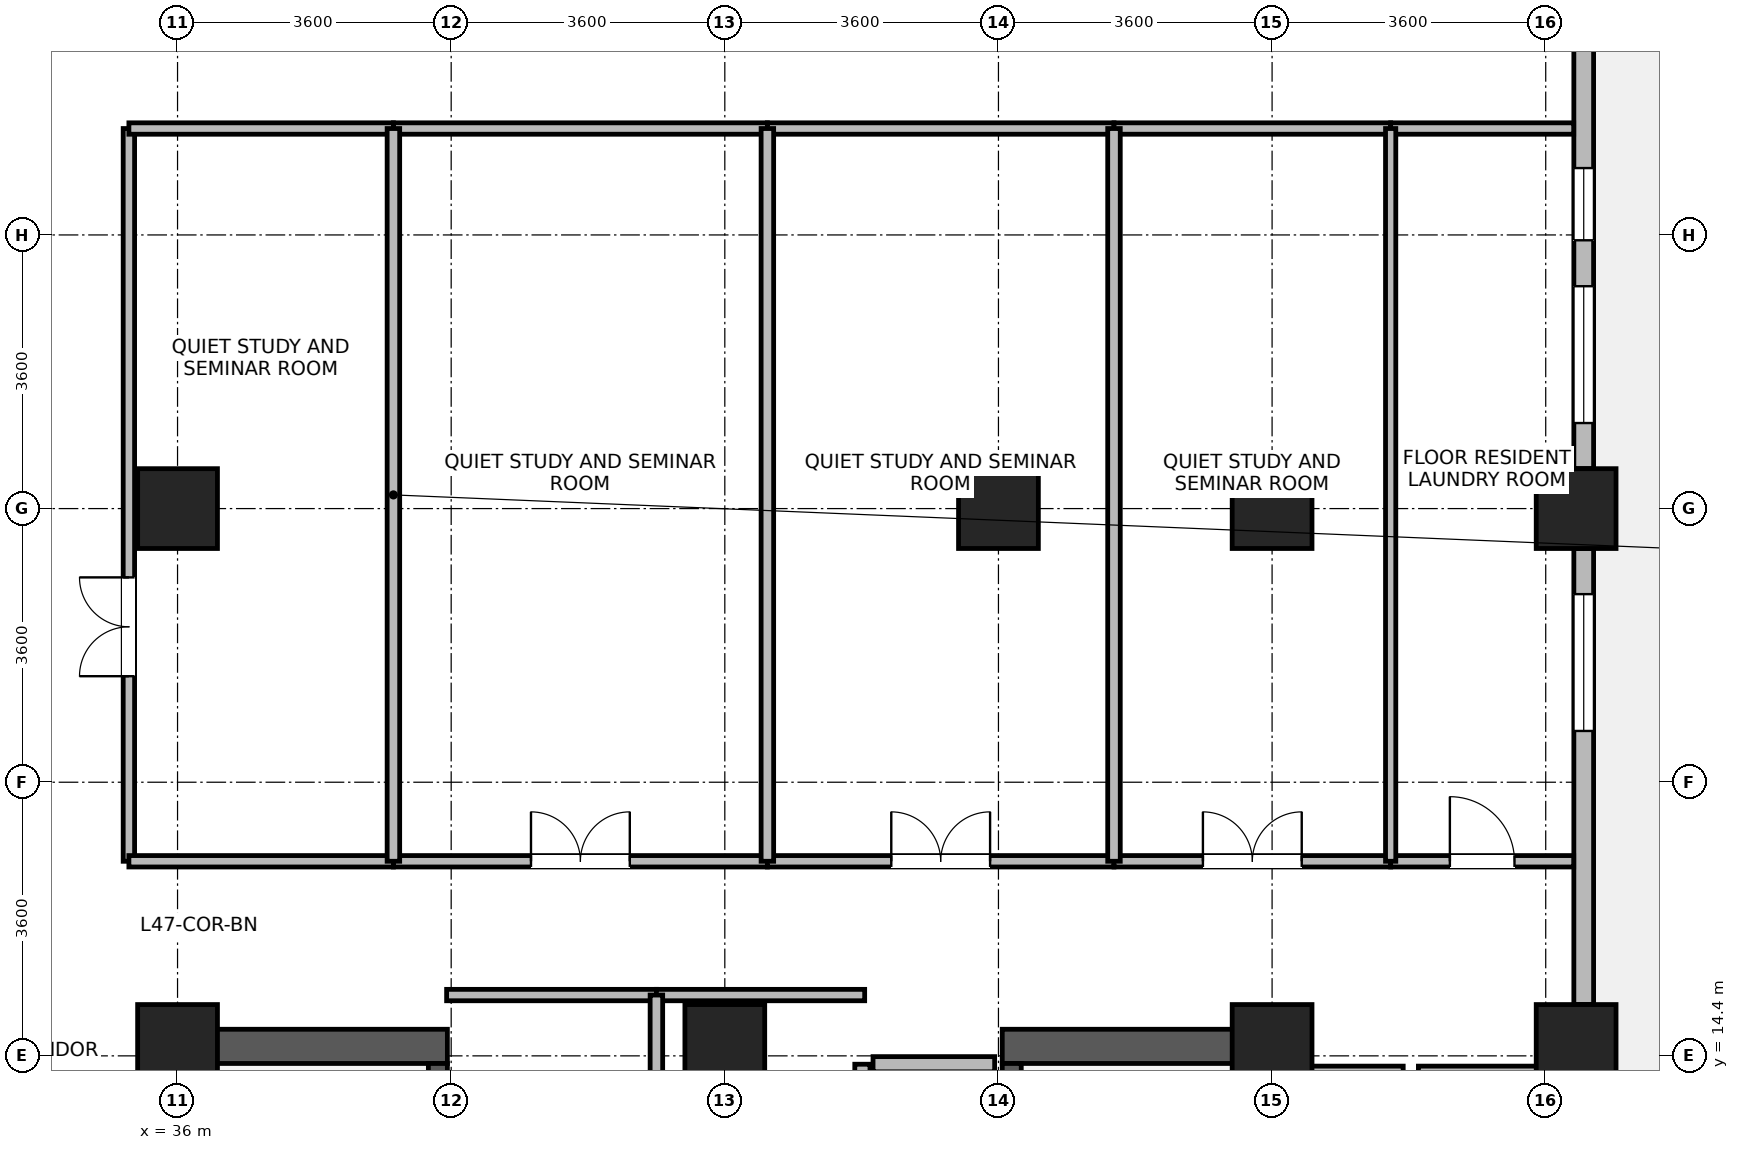
"""IFC4 building model, lengths in metres.
Left out: names, types, materials, properties, quantities, classifications, styles, units other than length and angle.
Written with IfcOpenShell. Run it as: python <this file> out.ifc"""

import sys

from ifc_helpers import new_model, si_unit, direction, frame, frame_2d, origin, origin_2d, place, context, subcontext, project, spatial, rectangle, extrude, source, transform, mapped, element, fill, save


model = new_model("IFC4")
c1 = context("Model", 3, precision=1e-05, world=origin(), true_north=direction((0.0, 1.0)))
c2 = subcontext(c1, "Body", "Model", "MODEL_VIEW")
j1 = project(units=[si_unit("LENGTHUNIT", "METRE"), si_unit("PLANEANGLEUNIT", "RADIAN")], contexts=[c1])
p1 = place(None, origin())
s1 = spatial("IfcSite", under=j1, at=p1, CompositionType="ELEMENT")
p2 = place(p1, origin())
s2 = spatial("IfcBuilding", under=s1, at=p2, CompositionType="ELEMENT")
p3 = place(p2, frame((0.0, 0.0, 184.6)))
s3 = spatial("IfcBuildingStorey", under=s2, at=p3, CompositionType="ELEMENT", Elevation=184.6)
for number, where, z_axis, x_axis in (
    (1, (36.125, 6.85, 0.0), (0.0, 0.0, 1.0), (0.0, 1.0, 0.0)),
    (2, (50.275, 6.85, 0.0), (0.0, 0.0, 1.0), (0.0, 1.0, 0.0)),
):
    element("IfcWall", number, at=place(p3, frame(where, z_axis=z_axis, x_axis=x_axis)), inside=s3, PredefinedType="SHEAR", context=c2, shape_type="SweptSolid", body=[
        extrude(rectangle(XDim=7.9, YDim=0.45, at=frame_2d((3.95, 0.0))), origin(), (0.0, 0.0, 1.0), 3.46),
    ])
for number, where, z_axis, x_axis in (
    (3, (36.35, 14.525, 0.0), (0.0, 0.0, 1.0), (1.0, 0.0, 0.0)),
    (4, (46.85, 14.525, 0.0), (0.0, 0.0, 1.0), (1.0, 0.0, 0.0)),
):
    element("IfcWall", number, at=place(p3, frame(where, z_axis=z_axis, x_axis=x_axis)), inside=s3, PredefinedType="SHEAR", context=c2, shape_type="SweptSolid", body=[
        extrude(rectangle(XDim=3.2, YDim=0.45, at=frame_2d((1.6, 0.0))), origin(), (0.0, 0.0, 1.0), 3.46),
    ])
p4 = place(p3, frame((39.425, 7.3, 0.0), z_axis=(0.0, 0.0, 1.0), x_axis=(0.0, 1.0, 0.0)))
e5 = element("IfcWall", 5, at=p4, inside=s3, PredefinedType="SHEAR", context=c2, shape_type="SweptSolid", body=[
    extrude(rectangle(XDim=7.0, YDim=0.25, at=frame_2d((3.5, 0.0))), origin(), (0.0, 0.0, 1.0), 3.46),
])
p5 = place(p4, frame((0.15, 0.0, 0.0)))
e6 = element("IfcOpeningElement", 6, at=p5, cuts=e5, PredefinedType="OPENING", context=c2, shape_type="SweptSolid", body=[
    extrude(rectangle(XDim=1.1, YDim=2.08, at=frame_2d((0.55, 1.04))), frame((0.0, 0.135, 0.0), z_axis=(0.0, -1.0, 0.0), x_axis=(1.0, 0.0, 0.0)), (0.0, 0.0, 1.0), 0.27),
])
p6 = place(p3, frame((46.975, 7.3, 0.0), z_axis=(0.0, 0.0, 1.0), x_axis=(0.0, 1.0, 0.0)))
e7 = element("IfcWall", 7, at=p6, inside=s3, PredefinedType="SHEAR", context=c2, shape_type="SweptSolid", body=[
    extrude(rectangle(XDim=7.0, YDim=0.25, at=frame_2d((3.5, 0.0))), origin(), (0.0, 0.0, 1.0), 3.46),
])
p7 = place(p6, frame((0.15, 0.0, 0.0)))
e8 = element("IfcOpeningElement", 8, at=p7, cuts=e7, PredefinedType="OPENING", context=c2, shape_type="SweptSolid", body=[
    extrude(rectangle(XDim=1.1, YDim=2.08, at=frame_2d((0.55, 1.04))), frame((0.0, 0.135, 0.0), z_axis=(0.0, -1.0, 0.0), x_axis=(1.0, 0.0, 0.0)), (0.0, 0.0, 1.0), 0.27),
])
m1 = source(origin(), c2, "Body", "SweptSolid", [
    extrude(rectangle(XDim=1.05, YDim=1.05, at=origin_2d()), origin(), (0.0, 0.0, 1.0), 3.7),
])
for number, where, z_axis, x_axis in (
    (9, (36.0, 21.6, 0.0), (0.0, 0.0, 1.0), (1.0, 0.0, 0.0)),
    (10, (46.8, 21.6, 0.0), (0.0, 0.0, 1.0), (1.0, 0.0, 0.0)),
    (11, (36.0, 14.55, 0.0), (0.0, 0.0, 1.0), (1.0, 0.0, 0.0)),
    (12, (43.2, 14.55, 0.0), (0.0, 0.0, 1.0), (1.0, 0.0, 0.0)),
    (13, (50.4, 14.55, 0.0), (0.0, 0.0, 1.0), (1.0, 0.0, 0.0)),
    (14, (50.4, 21.6, 0.0), (0.0, 0.0, 1.0), (1.0, 0.0, 0.0)),
    (15, (54.4, 14.55, 0.0), (0.0, 0.0, 1.0), (1.0, 0.0, 0.0)),
    (16, (54.4, 21.6, 0.0), (0.0, 0.0, 1.0), (1.0, 0.0, 0.0)),
):
    element("IfcColumn", number, at=place(p3, frame(where, z_axis=z_axis, x_axis=x_axis)), inside=s3, PredefinedType="COLUMN", context=c2, shape_type="MappedRepresentation", body=[
        mapped(m1, transform((0.0, 0.0, 0.0), x_axis=(1.0, 0.0, 0.0), y_axis=(0.0, 1.0, 0.0), z_axis=(0.0, 0.0, 1.0), scale=1.0)),
    ])
p8 = place(p3, frame((54.5, 21.074, 0.0), z_axis=(0.0, 0.0, 1.0), x_axis=(0.0, -1.0, 0.0)))
e17 = element("IfcWall", 17, at=p8, inside=s3, PredefinedType="STANDARD", context=c2, shape_type="SweptSolid", body=[
    extrude(rectangle(XDim=5.998, YDim=0.26, at=frame_2d((2.999, 0.0))), origin(), (0.0, 0.0, 1.0), 2.99),
])
p9 = place(p8, frame((0.6, 0.0, 0.85)))
e18 = element("IfcOpeningElement", 18, at=p9, cuts=e17, PredefinedType="OPENING", context=c2, shape_type="SweptSolid", body=[
    extrude(rectangle(XDim=1.8, YDim=1.85, at=frame_2d((0.9, 0.925))), frame((0.0, 0.14, 0.0), z_axis=(0.0, -1.0, 0.0), x_axis=(1.0, 0.0, 0.0)), (0.0, 0.0, 1.0), 0.28),
])
p10 = place(p3, frame((54.5, 28.124, 0.0), z_axis=(0.0, 0.0, 1.0), x_axis=(0.0, -1.0, 0.0)))
e19 = element("IfcWall", 19, at=p10, inside=s3, PredefinedType="STANDARD", context=c2, shape_type="SweptSolid", body=[
    extrude(rectangle(XDim=5.998, YDim=0.26, at=frame_2d((2.999, 0.0))), origin(), (0.0, 0.0, 1.0), 2.99),
])
p11 = place(p10, frame((3.598, 0.0, 0.85)))
e20 = element("IfcOpeningElement", 20, at=p11, cuts=e19, PredefinedType="OPENING", context=c2, shape_type="SweptSolid", body=[
    extrude(rectangle(XDim=1.8, YDim=1.85, at=frame_2d((0.9, 0.925))), frame((0.0, 0.14, 0.0), z_axis=(0.0, -1.0, 0.0), x_axis=(1.0, 0.0, 0.0)), (0.0, 0.0, 1.0), 0.28),
])
p12 = place(p10, frame((2.044, 0.0, 0.85)))
e21 = element("IfcOpeningElement", 21, at=p12, cuts=e19, PredefinedType="OPENING", context=c2, shape_type="SweptSolid", body=[
    extrude(rectangle(XDim=0.95, YDim=1.75, at=frame_2d((0.475, 0.875))), frame((0.0, 0.14, 0.0), z_axis=(0.0, -1.0, 0.0), x_axis=(1.0, 0.0, 0.0)), (0.0, 0.0, 1.0), 0.28),
])
p13 = place(p3, frame((50.475, 14.165, 0.0), z_axis=(0.0, 0.0, 1.0), x_axis=(1.0, 0.0, 0.0)))
e22 = element("IfcWall", 22, at=p13, inside=s3, PredefinedType="PARTITIONING", context=c2, shape_type="SweptSolid", body=[
    extrude(rectangle(XDim=1.65, YDim=0.2, at=frame_2d((0.825, 0.0))), origin(), (0.0, 0.0, 1.0), 3.44),
])
p14 = place(p3, frame((52.325, 14.165, 0.0), z_axis=(0.0, 0.0, 1.0), x_axis=(1.0, 0.0, 0.0)))
e23 = element("IfcWall", 23, at=p14, inside=s3, PredefinedType="PARTITIONING", context=c2, shape_type="SweptSolid", body=[
    extrude(rectangle(XDim=1.65, YDim=0.2, at=frame_2d((0.825, 0.0))), origin(), (0.0, 0.0, 1.0), 3.44),
])
p15 = place(p3, frame((45.15, 14.29, 0.0), z_axis=(0.0, 0.0, 1.0), x_axis=(1.0, 0.0, 0.0)))
e24 = element("IfcWall", 24, at=p15, inside=s3, PredefinedType="PARTITIONING", context=c2, shape_type="SweptSolid", body=[
    extrude(rectangle(XDim=1.6, YDim=0.2, at=frame_2d((0.8, 0.0))), origin(), (0.0, 0.0, 1.0), 2.44),
])
p16 = place(p3, frame((45.01, 11.61, 0.0), z_axis=(0.0, 0.0, 1.0), x_axis=(0.0, 1.0, 0.0)))
e25 = element("IfcWall", 25, at=p16, inside=s3, PredefinedType="PARTITIONING", context=c2, shape_type="SweptSolid", body=[
    extrude(rectangle(XDim=2.68, YDim=0.2, at=frame_2d((1.34, 0.0))), origin(), (0.0, 0.0, 1.0), 3.44),
])
p17 = place(p3, frame((35.36, 16.96, 0.0), z_axis=(0.0, 0.0, 1.0), x_axis=(0.0, 1.0, 0.0)))
e26 = element("IfcWall", 26, at=p17, inside=s3, PredefinedType="PARTITIONING", context=c2, shape_type="SweptSolid", body=[
    extrude(rectangle(XDim=9.64, YDim=0.15, at=frame_2d((4.82, 0.0))), origin(), (0.0, 0.0, 1.0), 3.44),
])
p18 = place(p17, frame((2.435, 0.0, 0.0)))
e27 = element("IfcOpeningElement", 27, at=p18, cuts=e26, PredefinedType="OPENING", context=c2, shape_type="SweptSolid", body=[
    extrude(rectangle(XDim=1.3, YDim=2.12, at=frame_2d((0.65, 1.06))), frame((0.0, 0.085, 0.0), z_axis=(0.0, -1.0, 0.0), x_axis=(1.0, 0.0, 0.0)), (0.0, 0.0, 1.0), 0.17),
])
p19 = place(p3, frame((38.84, 16.96, 0.0), z_axis=(0.0, 0.0, 1.0), x_axis=(1.0, 0.0, 0.0)))
e28 = element("IfcWall", 28, at=p19, inside=s3, PredefinedType="PARTITIONING", context=c2, shape_type="SweptSolid", body=[
    extrude(rectangle(XDim=4.92, YDim=0.15, at=frame_2d((2.46, 0.0))), origin(), (0.0, 0.0, 1.0), 3.44),
])
p20 = place(p19, frame((1.81, 0.0, 0.0)))
e29 = element("IfcOpeningElement", 29, at=p20, cuts=e28, PredefinedType="OPENING", context=c2, shape_type="SweptSolid", body=[
    extrude(rectangle(XDim=1.3, YDim=2.12, at=frame_2d((0.65, 1.06))), frame((0.0, 0.085, 0.0), z_axis=(0.0, -1.0, 0.0), x_axis=(1.0, 0.0, 0.0)), (0.0, 0.0, 1.0), 0.17),
])
p21 = place(p3, frame((38.84, 26.6, 0.0), z_axis=(0.0, 0.0, 1.0), x_axis=(1.0, 0.0, 0.0)))
e30 = element("IfcWall", 30, at=p21, inside=s3, PredefinedType="PARTITIONING", context=c2, shape_type="SweptSolid", body=[
    extrude(rectangle(XDim=4.92, YDim=0.15, at=frame_2d((2.46, 0.0))), origin(), (0.0, 0.0, 1.0), 3.44),
])
p22 = place(p3, frame((43.76, 16.96, 0.0), z_axis=(0.0, 0.0, 1.0), x_axis=(1.0, 0.0, 0.0)))
e31 = element("IfcWall", 31, at=p22, inside=s3, PredefinedType="PARTITIONING", context=c2, shape_type="SweptSolid", body=[
    extrude(rectangle(XDim=4.56, YDim=0.15, at=frame_2d((2.28, 0.0))), origin(), (0.0, 0.0, 1.0), 3.44),
])
p23 = place(p22, frame((1.63, 0.0, 0.0)))
e32 = element("IfcOpeningElement", 32, at=p23, cuts=e31, PredefinedType="OPENING", context=c2, shape_type="SweptSolid", body=[
    extrude(rectangle(XDim=1.3, YDim=2.12, at=frame_2d((0.65, 1.06))), frame((0.0, 0.085, 0.0), z_axis=(0.0, -1.0, 0.0), x_axis=(1.0, 0.0, 0.0)), (0.0, 0.0, 1.0), 0.17),
])
p24 = place(p3, frame((43.76, 26.6, 0.0), z_axis=(0.0, 0.0, 1.0), x_axis=(1.0, 0.0, 0.0)))
e33 = element("IfcWall", 33, at=p24, inside=s3, PredefinedType="PARTITIONING", context=c2, shape_type="SweptSolid", body=[
    extrude(rectangle(XDim=4.56, YDim=0.15, at=frame_2d((2.28, 0.0))), origin(), (0.0, 0.0, 1.0), 3.44),
])
p25 = place(p3, frame((48.32, 16.96, 0.0), z_axis=(0.0, 0.0, 1.0), x_axis=(1.0, 0.0, 0.0)))
e34 = element("IfcWall", 34, at=p25, inside=s3, PredefinedType="PARTITIONING", context=c2, shape_type="SweptSolid", body=[
    extrude(rectangle(XDim=3.64, YDim=0.15, at=frame_2d((1.82, 0.0))), origin(), (0.0, 0.0, 1.0), 3.44),
])
p26 = place(p25, frame((1.17, 0.0, 0.0)))
e35 = element("IfcOpeningElement", 35, at=p26, cuts=e34, PredefinedType="OPENING", context=c2, shape_type="SweptSolid", body=[
    extrude(rectangle(XDim=1.3, YDim=2.12, at=frame_2d((0.65, 1.06))), frame((0.0, 0.085, 0.0), z_axis=(0.0, -1.0, 0.0), x_axis=(1.0, 0.0, 0.0)), (0.0, 0.0, 1.0), 0.17),
])
p27 = place(p3, frame((48.32, 26.6, 0.0), z_axis=(0.0, 0.0, 1.0), x_axis=(1.0, 0.0, 0.0)))
e36 = element("IfcWall", 36, at=p27, inside=s3, PredefinedType="PARTITIONING", context=c2, shape_type="SweptSolid", body=[
    extrude(rectangle(XDim=3.64, YDim=0.15, at=frame_2d((1.82, 0.0))), origin(), (0.0, 0.0, 1.0), 3.44),
])
for number, where, z_axis, x_axis in (
    (37, (35.36, 16.96, 0.0), (0.0, 0.0, 1.0), (1.0, 0.0, 0.0)),
    (38, (35.36, 26.6, 0.0), (0.0, 0.0, 1.0), (1.0, 0.0, 0.0)),
):
    element("IfcWall", number, at=place(p3, frame(where, z_axis=z_axis, x_axis=x_axis)), inside=s3, PredefinedType="PARTITIONING", context=c2, shape_type="SweptSolid", body=[
        extrude(rectangle(XDim=3.48, YDim=0.15, at=frame_2d((1.74, 0.0))), origin(), (0.0, 0.0, 1.0), 3.44),
    ])
p28 = place(p3, frame((39.54, 15.2, 0.0), z_axis=(0.0, 0.0, 1.0), x_axis=(1.0, 0.0, 0.0)))
e39 = element("IfcWall", 39, at=p28, inside=s3, PredefinedType="PARTITIONING", context=c2, shape_type="SweptSolid", body=[
    extrude(rectangle(XDim=2.76, YDim=0.15, at=frame_2d((1.38, 0.0))), origin(), (0.0, 0.0, 1.0), 3.44),
])
p29 = place(p3, frame((42.3, 15.2, 0.0), z_axis=(0.0, 0.0, 1.0), x_axis=(1.0, 0.0, 0.0)))
e40 = element("IfcWall", 40, at=p29, inside=s3, PredefinedType="PARTITIONING", context=c2, shape_type="SweptSolid", body=[
    extrude(rectangle(XDim=2.74, YDim=0.15, at=frame_2d((1.37, 0.0))), origin(), (0.0, 0.0, 1.0), 3.44),
])
p30 = place(p3, frame((51.96, 16.96, 0.0), z_axis=(0.0, 0.0, 1.0), x_axis=(1.0, 0.0, 0.0)))
e41 = element("IfcWall", 41, at=p30, inside=s3, PredefinedType="PARTITIONING", context=c2, shape_type="SweptSolid", body=[
    extrude(rectangle(XDim=2.408, YDim=0.15, at=frame_2d((1.204, 0.0))), origin(), (0.0, 0.0, 1.0), 3.44),
])
p31 = place(p30, frame((0.779, 0.0, 0.0)))
e42 = element("IfcOpeningElement", 42, at=p31, cuts=e41, PredefinedType="OPENING", context=c2, shape_type="SweptSolid", body=[
    extrude(rectangle(XDim=0.85, YDim=2.04, at=frame_2d((0.425, 1.02))), frame((0.0, 0.085, 0.0), z_axis=(0.0, -1.0, 0.0), x_axis=(1.0, 0.0, 0.0)), (0.0, 0.0, 1.0), 0.17),
])
p32 = place(p3, frame((51.96, 26.6, 0.0), z_axis=(0.0, 0.0, 1.0), x_axis=(1.0, 0.0, 0.0)))
e43 = element("IfcWall", 43, at=p32, inside=s3, PredefinedType="PARTITIONING", context=c2, shape_type="SweptSolid", body=[
    extrude(rectangle(XDim=2.408, YDim=0.15, at=frame_2d((1.204, 0.0))), origin(), (0.0, 0.0, 1.0), 3.44),
])
for number, where, z_axis, x_axis in (
    (44, (38.84, 16.96, 0.0), (0.0, 0.0, 1.0), (0.0, 1.0, 0.0)),
    (45, (43.76, 16.96, 0.0), (0.0, 0.0, 1.0), (0.0, 1.0, 0.0)),
    (46, (48.32, 16.96, 0.0), (0.0, 0.0, 1.0), (0.0, 1.0, 0.0)),
):
    element("IfcWall", number, at=place(p3, frame(where, z_axis=z_axis, x_axis=x_axis)), inside=s3, PredefinedType="PARTITIONING", context=c2, shape_type="SweptSolid", body=[
        extrude(rectangle(XDim=9.64, YDim=0.165, at=frame_2d((4.82, 0.0))), origin(), (0.0, 0.0, 1.0), 3.44),
    ])
p33 = place(p3, frame((51.96, 16.96, 0.0), z_axis=(0.0, 0.0, 1.0), x_axis=(0.0, 1.0, 0.0)))
e47 = element("IfcWall", 47, at=p33, inside=s3, PredefinedType="PARTITIONING", context=c2, shape_type="SweptSolid", body=[
    extrude(rectangle(XDim=9.64, YDim=0.135, at=frame_2d((4.82, 0.0))), origin(), (0.0, 0.0, 1.0), 3.44),
])
p34 = place(p3, frame((42.3, 11.64, 0.0), z_axis=(0.0, 0.0, 1.0), x_axis=(0.0, 1.0, 0.0)))
e48 = element("IfcWall", 48, at=p34, inside=s3, PredefinedType="PARTITIONING", context=c2, shape_type="SweptSolid", body=[
    extrude(rectangle(XDim=3.56, YDim=0.165, at=frame_2d((1.78, 0.0))), origin(), (0.0, 0.0, 1.0), 3.44),
])
p35 = place(p9, origin())
e49 = element("IfcWindow", 49, at=p35, inside=s3, PartitioningType="SINGLE_PANEL", PredefinedType="WINDOW", context=c2, shape_type="SweptSolid", body=[
    extrude(rectangle(XDim=1.8, YDim=1.85, at=frame_2d((0.9, 0.925))), frame((0.0, 0.03, 0.0), z_axis=(0.0, -1.0, 0.0), x_axis=(1.0, 0.0, 0.0)), (0.0, 0.0, 1.0), 0.06),
])
fill(e18, e49)
p36 = place(p11, origin())
e50 = element("IfcWindow", 50, at=p36, inside=s3, PartitioningType="SINGLE_PANEL", PredefinedType="WINDOW", context=c2, shape_type="SweptSolid", body=[
    extrude(rectangle(XDim=1.8, YDim=1.85, at=frame_2d((0.9, 0.925))), frame((0.0, 0.03, 0.0), z_axis=(0.0, -1.0, 0.0), x_axis=(1.0, 0.0, 0.0)), (0.0, 0.0, 1.0), 0.06),
])
fill(e20, e50)
p37 = place(p12, origin())
e51 = element("IfcWindow", 51, at=p37, inside=s3, PartitioningType="SINGLE_PANEL", PredefinedType="WINDOW", context=c2, shape_type="SweptSolid", body=[
    extrude(rectangle(XDim=0.95, YDim=1.75, at=frame_2d((0.475, 0.875))), frame((0.0, 0.03, 0.0), z_axis=(0.0, -1.0, 0.0), x_axis=(1.0, 0.0, 0.0)), (0.0, 0.0, 1.0), 0.06),
])
fill(e21, e51)
p38 = place(p18, origin())
e52 = element("IfcDoor", 52, at=p38, inside=s3, OperationType="DOUBLE_DOOR_SINGLE_SWING", PredefinedType="DOOR", context=c2, shape_type="SweptSolid", body=[
    extrude(rectangle(XDim=1.3, YDim=2.12, at=frame_2d((0.65, 1.06))), frame((0.0, 0.025, 0.0), z_axis=(0.0, -1.0, 0.0), x_axis=(1.0, 0.0, 0.0)), (0.0, 0.0, 1.0), 0.05),
])
fill(e27, e52)
p39 = place(p20, origin())
e53 = element("IfcDoor", 53, at=p39, inside=s3, OperationType="DOUBLE_DOOR_SINGLE_SWING", PredefinedType="DOOR", context=c2, shape_type="SweptSolid", body=[
    extrude(rectangle(XDim=1.3, YDim=2.12, at=frame_2d((0.65, 1.06))), frame((0.0, 0.025, 0.0), z_axis=(0.0, -1.0, 0.0), x_axis=(1.0, 0.0, 0.0)), (0.0, 0.0, 1.0), 0.05),
])
fill(e29, e53)
p40 = place(p23, origin())
e54 = element("IfcDoor", 54, at=p40, inside=s3, OperationType="DOUBLE_DOOR_SINGLE_SWING", PredefinedType="DOOR", context=c2, shape_type="SweptSolid", body=[
    extrude(rectangle(XDim=1.3, YDim=2.12, at=frame_2d((0.65, 1.06))), frame((0.0, 0.025, 0.0), z_axis=(0.0, -1.0, 0.0), x_axis=(1.0, 0.0, 0.0)), (0.0, 0.0, 1.0), 0.05),
])
fill(e32, e54)
p41 = place(p26, origin())
e55 = element("IfcDoor", 55, at=p41, inside=s3, OperationType="DOUBLE_DOOR_SINGLE_SWING", PredefinedType="DOOR", context=c2, shape_type="SweptSolid", body=[
    extrude(rectangle(XDim=1.3, YDim=2.12, at=frame_2d((0.65, 1.06))), frame((0.0, 0.025, 0.0), z_axis=(0.0, -1.0, 0.0), x_axis=(1.0, 0.0, 0.0)), (0.0, 0.0, 1.0), 0.05),
])
fill(e35, e55)
p42 = place(p31, origin())
e56 = element("IfcDoor", 56, at=p42, inside=s3, OperationType="SINGLE_SWING_LEFT", PredefinedType="DOOR", context=c2, shape_type="SweptSolid", body=[
    extrude(rectangle(XDim=0.85, YDim=2.04, at=frame_2d((0.425, 1.02))), frame((0.0, 0.025, 0.0), z_axis=(0.0, -1.0, 0.0), x_axis=(1.0, 0.0, 0.0)), (0.0, 0.0, 1.0), 0.05),
])
fill(e42, e56)
save(model, sys.argv[1])
